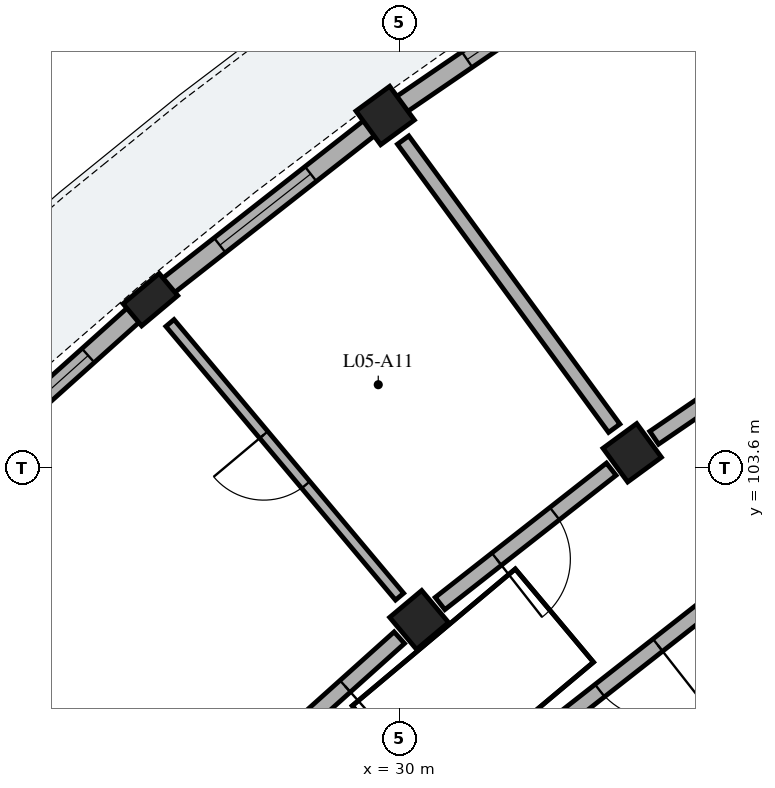
"""IFC4 building model, lengths in metres.
Left out: names, types, materials, properties, quantities, classifications, styles, units other than length and angle.
Written with IfcOpenShell. Run it as: python <this file> out.ifc"""

import sys

from ifc_helpers import new_model, si_unit, direction, frame, frame_2d, origin, origin_2d, place, context, subcontext, project, spatial, rectangle, extrude, element, fill, save


model = new_model("IFC4")
c1 = context("Model", 3, precision=1e-05, world=origin(), true_north=direction((0.0, 1.0)))
c2 = subcontext(c1, "Body", "Model", "MODEL_VIEW")
j1 = project(units=[si_unit("LENGTHUNIT", "METRE"), si_unit("PLANEANGLEUNIT", "RADIAN")], contexts=[c1])
p1 = place(None, origin())
s1 = spatial("IfcSite", under=j1, at=p1, CompositionType="ELEMENT")
p2 = place(p1, origin())
s2 = spatial("IfcBuilding", under=s1, at=p2, CompositionType="ELEMENT")
p3 = place(p2, frame((0.0, 0.0, 18.92)))
s3 = spatial("IfcBuildingStorey", under=s2, at=p3, CompositionType="ELEMENT", Elevation=18.92)
for number, where, z_axis, x_axis in (
    (1, (33.061, 103.804, 0.0), (0.0, 0.0, 1.0), (-0.591, 0.807, 0.0)),
    (2, (29.811, 108.241, 0.0), (0.0, 0.0, 1.0), (-0.591, 0.807, 0.0)),
    (3, (30.257, 101.605, 0.0), (0.0, 0.0, 1.0), (-0.643, 0.766, 0.0)),
):
    element("IfcColumn", number, at=place(p3, frame(where, z_axis=z_axis, x_axis=x_axis)), inside=s3, PredefinedType="COLUMN", context=c2, shape_type="SweptSolid", body=[
        extrude(rectangle(XDim=0.55, YDim=0.55, at=origin_2d()), origin(), (0.0, 0.0, 1.0), 3.11),
    ])
p4 = place(p3, frame((26.722, 105.818, 0.0), z_axis=(0.0, 0.0, 1.0), x_axis=(-0.642787636427, 0.766044420681, 0.0)))
e4 = element("IfcColumn", 4, at=p4, inside=s3, PredefinedType="PILASTER", context=c2, shape_type="SweptSolid", body=[
    extrude(rectangle(XDim=0.38, YDim=0.62, at=origin_2d()), origin(), (0.0, 0.0, 1.0), 3.11),
])
p5 = place(p3, frame((32.92, 110.365, 0.0), z_axis=(0.0, 0.0, 1.0), x_axis=(-0.825745840472, -0.56404238045, 0.0)))
e5 = element("IfcWall", 5, at=p5, inside=s3, PredefinedType="SOLIDWALL", context=c2, shape_type="SweptSolid", body=[
    extrude(rectangle(XDim=3.521, YDim=0.245, at=frame_2d((1.76, 0.0))), origin(), (0.0, 0.0, 1.0), 2.355),
])
p6 = place(p5, frame((1.06, 0.0, 0.35)))
e6 = element("IfcOpeningElement", 6, at=p6, cuts=e5, PredefinedType="OPENING", context=c2, shape_type="SweptSolid", body=[
    extrude(rectangle(XDim=1.4, YDim=1.635, at=frame_2d((0.7, 0.817))), frame((0.0, 0.133, 0.0), z_axis=(0.0, -1.0, 0.0), x_axis=(1.0, 0.0, 0.0)), (0.0, 0.0, 1.0), 0.265),
])
p7 = place(p3, frame((29.618, 108.09, 0.0), z_axis=(0.0, 0.0, 1.0), x_axis=(-0.786813798172, -0.617190446301, 0.0)))
e7 = element("IfcWall", 7, at=p7, inside=s3, PredefinedType="SOLIDWALL", context=c2, shape_type="SweptSolid", body=[
    extrude(rectangle(XDim=3.521, YDim=0.245, at=frame_2d((1.76, 0.0))), origin(), (0.0, 0.0, 1.0), 2.355),
])
p8 = place(p7, frame((1.0, 0.0, 0.55)))
e8 = element("IfcOpeningElement", 8, at=p8, cuts=e7, PredefinedType="OPENING", context=c2, shape_type="SweptSolid", body=[
    extrude(rectangle(XDim=1.52, YDim=1.485, at=frame_2d((0.76, 0.743))), frame((0.0, 0.133, 0.0), z_axis=(0.0, -1.0, 0.0), x_axis=(1.0, 0.0, 0.0)), (0.0, 0.0, 1.0), 0.265),
])
p9 = place(p3, frame((26.603, 105.711, 0.0), z_axis=(0.0, 0.0, 1.0), x_axis=(-0.744413726571, -0.667718656092, 0.0)))
e9 = element("IfcWall", 9, at=p9, inside=s3, PredefinedType="SOLIDWALL", context=c2, shape_type="SweptSolid", body=[
    extrude(rectangle(XDim=3.521, YDim=0.245, at=frame_2d((1.76, 0.0))), origin(), (0.0, 0.0, 1.0), 2.355),
])
p10 = place(p9, frame((0.94, 0.0, 0.55)))
e10 = element("IfcOpeningElement", 10, at=p10, cuts=e9, PredefinedType="OPENING", context=c2, shape_type="SweptSolid", body=[
    extrude(rectangle(XDim=1.64, YDim=1.56, at=frame_2d((0.82, 0.78))), frame((0.0, 0.133, 0.0), z_axis=(0.0, -1.0, 0.0), x_axis=(1.0, 0.0, 0.0)), (0.0, 0.0, 1.0), 0.265),
])
p11 = place(p3, frame((35.714, 105.616, 0.0), z_axis=(0.0, 0.0, 1.0), x_axis=(-0.825779671787, -0.563992848947, 0.0)))
e11 = element("IfcWall", 11, at=p11, inside=s3, PredefinedType="PARTITIONING", context=c2, shape_type="SweptSolid", body=[
    extrude(rectangle(XDim=2.863, YDim=0.205, at=frame_2d((1.432, 0.0))), origin(), (0.0, 0.0, 1.0), 2.37),
])
p12 = place(p11, frame((0.937, 0.0, 0.0)))
e12 = element("IfcOpeningElement", 12, at=p12, cuts=e11, PredefinedType="OPENING", context=c2, shape_type="SweptSolid", body=[
    extrude(rectangle(XDim=0.99, YDim=2.16, at=frame_2d((0.495, 1.08))), frame((0.0, 0.113, 0.0), z_axis=(0.0, -1.0, 0.0), x_axis=(1.0, 0.0, 0.0)), (0.0, 0.0, 1.0), 0.225),
])
p13 = place(p3, frame((32.824, 104.126, 0.0), z_axis=(0.0, 0.0, 1.0), x_axis=(-0.590910940129, 0.806736797745, 0.0)))
e13 = element("IfcWall", 13, at=p13, inside=s3, PredefinedType="PARTITIONING", context=c2, shape_type="SweptSolid", body=[
    extrude(rectangle(XDim=4.7, YDim=0.185, at=frame_2d((2.35, 0.0))), origin(), (0.0, 0.0, 1.0), 2.37),
])
p14 = place(p3, frame((32.785, 103.588, 0.0), z_axis=(0.0, 0.0, 1.0), x_axis=(-0.786806323554, -0.617199975061, 0.0)))
e14 = element("IfcWall", 14, at=p14, inside=s3, PredefinedType="PARTITIONING", context=c2, shape_type="SweptSolid", body=[
    extrude(rectangle(XDim=2.863, YDim=0.205, at=frame_2d((1.432, 0.0))), origin(), (0.0, 0.0, 1.0), 2.37),
])
p15 = place(p14, frame((0.947, 0.0, 0.0)))
e15 = element("IfcOpeningElement", 15, at=p15, cuts=e14, PredefinedType="OPENING", context=c2, shape_type="SweptSolid", body=[
    extrude(rectangle(XDim=0.97, YDim=2.15, at=frame_2d((0.485, 1.075))), frame((0.0, 0.113, 0.0), z_axis=(0.0, -1.0, 0.0), x_axis=(1.0, 0.0, 0.0)), (0.0, 0.0, 1.0), 0.225),
])
p16 = place(p3, frame((34.085, 101.813, 0.0), z_axis=(0.0, 0.0, 1.0), x_axis=(-0.786835457019, -0.617162833924, 0.0)))
e16 = element("IfcWall", 16, at=p16, inside=s3, PredefinedType="PARTITIONING", context=c2, shape_type="SweptSolid", body=[
    extrude(rectangle(XDim=2.718, YDim=0.205, at=frame_2d((1.359, 0.0))), origin(), (0.0, 0.0, 1.0), 2.37),
])
p17 = place(p16, frame((0.874, 0.0, 0.0)))
e17 = element("IfcOpeningElement", 17, at=p17, cuts=e16, PredefinedType="OPENING", context=c2, shape_type="SweptSolid", body=[
    extrude(rectangle(XDim=0.97, YDim=2.15, at=frame_2d((0.485, 1.075))), frame((0.0, 0.113, 0.0), z_axis=(0.0, -1.0, 0.0), x_axis=(1.0, 0.0, 0.0)), (0.0, 0.0, 1.0), 0.225),
])
p18 = place(p3, frame((30.0, 101.911, 0.0), z_axis=(0.0, 0.0, 1.0), x_axis=(-0.642811926223, 0.766024038465, 0.0)))
e18 = element("IfcWall", 18, at=p18, inside=s3, PredefinedType="PLUMBINGWALL", context=c2, shape_type="SweptSolid", body=[
    extrude(rectangle(XDim=4.7, YDim=0.14, at=frame_2d((2.35, 0.0))), origin(), (0.0, 0.0, 1.0), 2.37),
])
p19 = place(p18, frame((1.92, 0.0, 0.0)))
e19 = element("IfcOpeningElement", 19, at=p19, cuts=e18, PredefinedType="OPENING", context=c2, shape_type="SweptSolid", body=[
    extrude(rectangle(XDim=0.86, YDim=2.06, at=frame_2d((0.43, 1.03))), frame((0.0, 0.08, 0.0), z_axis=(0.0, -1.0, 0.0), x_axis=(1.0, 0.0, 0.0)), (0.0, 0.0, 1.0), 0.16),
])
p20 = place(p3, frame((29.997, 101.371, 0.0), z_axis=(0.0, 0.0, 1.0), x_axis=(-0.744433521088, -0.667696587291, 0.0)))
e20 = element("IfcWall", 20, at=p20, inside=s3, PredefinedType="PARTITIONING", context=c2, shape_type="SweptSolid", body=[
    extrude(rectangle(XDim=2.863, YDim=0.205, at=frame_2d((1.432, 0.0))), origin(), (0.0, 0.0, 1.0), 2.37),
])
p21 = place(p20, frame((0.957, 0.0, 0.0)))
e21 = element("IfcOpeningElement", 21, at=p21, cuts=e20, PredefinedType="OPENING", context=c2, shape_type="SweptSolid", body=[
    extrude(rectangle(XDim=0.95, YDim=2.13, at=frame_2d((0.475, 1.065))), frame((0.0, 0.113, 0.0), z_axis=(0.0, -1.0, 0.0), x_axis=(1.0, 0.0, 0.0)), (0.0, 0.0, 1.0), 0.225),
])
p22 = place(p6, origin())
e22 = element("IfcWindow", 22, at=p22, inside=s3, PartitioningType="SINGLE_PANEL", PredefinedType="WINDOW", context=c2, shape_type="SweptSolid", body=[
    extrude(rectangle(XDim=1.4, YDim=1.635, at=frame_2d((0.7, 0.817))), frame((0.0, 0.03, 0.0), z_axis=(0.0, -1.0, 0.0), x_axis=(1.0, 0.0, 0.0)), (0.0, 0.0, 1.0), 0.06),
])
fill(e6, e22)
p23 = place(p8, origin())
e23 = element("IfcWindow", 23, at=p23, inside=s3, PartitioningType="SINGLE_PANEL", PredefinedType="WINDOW", context=c2, shape_type="SweptSolid", body=[
    extrude(rectangle(XDim=1.52, YDim=1.485, at=frame_2d((0.76, 0.743))), frame((0.0, 0.03, 0.0), z_axis=(0.0, -1.0, 0.0), x_axis=(1.0, 0.0, 0.0)), (0.0, 0.0, 1.0), 0.06),
])
fill(e8, e23)
p24 = place(p10, origin())
e24 = element("IfcWindow", 24, at=p24, inside=s3, PartitioningType="SINGLE_PANEL", PredefinedType="WINDOW", context=c2, shape_type="SweptSolid", body=[
    extrude(rectangle(XDim=1.64, YDim=1.56, at=frame_2d((0.82, 0.78))), frame((0.0, 0.03, 0.0), z_axis=(0.0, -1.0, 0.0), x_axis=(1.0, 0.0, 0.0)), (0.0, 0.0, 1.0), 0.06),
])
fill(e10, e24)
p25 = place(p15, origin())
e25 = element("IfcDoor", 25, at=p25, inside=s3, OperationType="SINGLE_SWING_RIGHT", PredefinedType="DOOR", context=c2, shape_type="SweptSolid", body=[
    extrude(rectangle(XDim=0.97, YDim=2.15, at=frame_2d((0.485, 1.075))), frame((0.0, 0.025, 0.0), z_axis=(0.0, -1.0, 0.0), x_axis=(1.0, 0.0, 0.0)), (0.0, 0.0, 1.0), 0.05),
])
fill(e15, e25)
p26 = place(p17, origin())
e26 = element("IfcDoor", 26, at=p26, inside=s3, OperationType="SINGLE_SWING_LEFT", PredefinedType="DOOR", context=c2, shape_type="SweptSolid", body=[
    extrude(rectangle(XDim=0.97, YDim=2.15, at=frame_2d((0.485, 1.075))), frame((0.0, 0.025, 0.0), z_axis=(0.0, -1.0, 0.0), x_axis=(1.0, 0.0, 0.0)), (0.0, 0.0, 1.0), 0.05),
])
fill(e17, e26)
p27 = place(p19, origin())
e27 = element("IfcDoor", 27, at=p27, inside=s3, OperationType="SINGLE_SWING_RIGHT", PredefinedType="DOOR", context=c2, shape_type="SweptSolid", body=[
    extrude(rectangle(XDim=0.86, YDim=2.06, at=frame_2d((0.43, 1.03))), frame((0.0, 0.025, 0.0), z_axis=(0.0, -1.0, 0.0), x_axis=(1.0, 0.0, 0.0)), (0.0, 0.0, 1.0), 0.05),
])
fill(e19, e27)
p28 = place(p21, origin())
e28 = element("IfcDoor", 28, at=p28, inside=s3, OperationType="SINGLE_SWING_LEFT", PredefinedType="DOOR", context=c2, shape_type="SweptSolid", body=[
    extrude(rectangle(XDim=0.95, YDim=2.13, at=frame_2d((0.475, 1.065))), frame((0.0, 0.025, 0.0), z_axis=(0.0, -1.0, 0.0), x_axis=(1.0, 0.0, 0.0)), (0.0, 0.0, 1.0), 0.05),
])
fill(e21, e28)
save(model, sys.argv[1])
